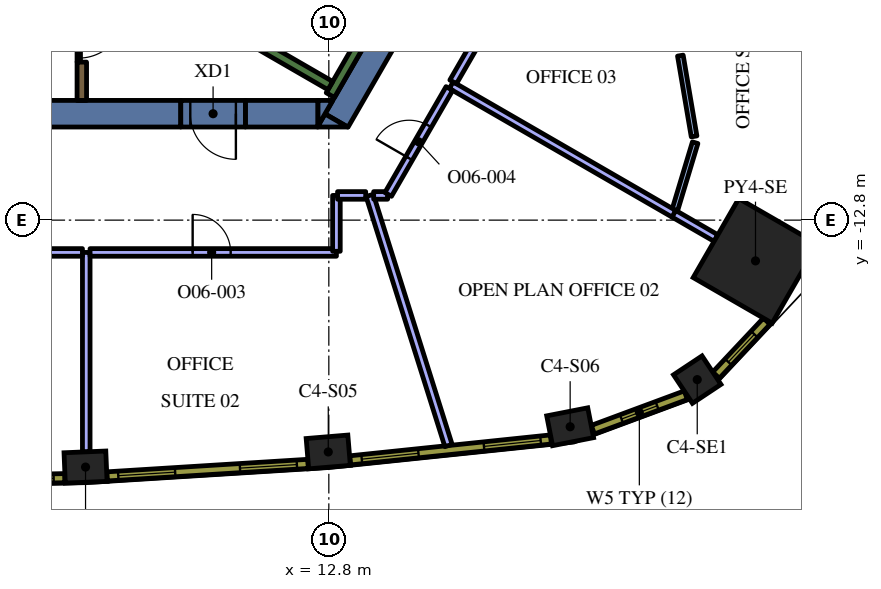
"""IFC4 building model, lengths in metres.
Left out: names, types, materials, properties, quantities, classifications, styles, units other than length and angle.
Written with IfcOpenShell. Run it as: python <this file> out.ifc"""

import sys

from ifc_helpers import new_model, si_unit, direction, frame, frame_2d, origin, origin_2d, place, context, subcontext, project, spatial, polyline, rectangle, outline, extrude, element, fill, save


model = new_model("IFC4")
c1 = context("Model", 3, precision=1e-05, world=origin(), true_north=direction((0.0, 1.0)))
c2 = subcontext(c1, "Body", "Model", "MODEL_VIEW")
j1 = project(units=[si_unit("LENGTHUNIT", "METRE"), si_unit("PLANEANGLEUNIT", "RADIAN")], contexts=[c1])
p1 = place(None, origin())
s1 = spatial("IfcSite", under=j1, at=p1, CompositionType="ELEMENT")
p2 = place(p1, origin())
s2 = spatial("IfcBuilding", under=s1, at=p2, CompositionType="ELEMENT")
p3 = place(p2, frame((0.0, 0.0, 201.6)))
s3 = spatial("IfcBuildingStorey", under=s2, at=p3, CompositionType="ELEMENT", Elevation=201.6)
p4 = place(p3, frame((24.027, -13.872, 0.0), z_axis=(0.0, 0.0, 1.0), x_axis=(0.866025403784, -0.5, 0.0)))
e1 = element("IfcColumn", 1, at=p4, inside=s3, PredefinedType="COLUMN", context=c2, shape_type="SweptSolid", body=[
    extrude(rectangle(XDim=2.4, YDim=2.4, at=origin_2d()), origin(), (0.0, 0.0, 1.0), 4.2),
])
for number, where, z_axis, x_axis in (
    (2, (6.398, -19.298, 0.0), (0.0, 0.0, 1.0), (0.999, 0.041, 0.0)),
    (3, (12.785, -18.9, 0.0), (0.0, 0.0, 1.0), (0.997, 0.083, 0.0)),
    (4, (19.15, -18.237, 0.0), (0.0, 0.0, 1.0), (0.981, 0.192, 0.0)),
):
    element("IfcColumn", number, at=place(p3, frame(where, z_axis=z_axis, x_axis=x_axis)), inside=s3, PredefinedType="COLUMN", context=c2, shape_type="SweptSolid", body=[
        extrude(rectangle(XDim=1.1, YDim=0.8, at=origin_2d()), origin(), (0.0, 0.0, 1.0), 4.2),
    ])
p5 = place(p3, frame((22.494, -16.997, 0.0), z_axis=(0.0, 0.0, 1.0), x_axis=(0.833238868178, 0.552913183563, 0.0)))
e5 = element("IfcColumn", 5, at=p5, inside=s3, PredefinedType="COLUMN", context=c2, shape_type="SweptSolid", body=[
    extrude(rectangle(XDim=0.9, YDim=0.9, at=origin_2d()), origin(), (0.0, 0.0, 1.0), 4.2),
])
p6 = place(p3, frame((13.003, -10.179, 0.0), z_axis=(0.0, 0.0, 1.0), x_axis=(0.499972675833, 0.866041178825, 0.0)))
e6 = element("IfcWall", 6, at=p6, inside=s3, PredefinedType="SOLIDWALL", context=c2, shape_type="SweptSolid", body=[
    extrude(rectangle(XDim=3.829, YDim=0.7, at=frame_2d((1.915, 0.0))), origin(), (0.0, 0.0, 1.0), 4.2),
])
p7 = place(p3, origin())
e7 = element("IfcWall", 7, at=p7, inside=s3, PredefinedType="SOLIDWALL", context=c2, shape_type="SweptSolid", body=[
    extrude(outline(polyline([(12.5, -10.35), (12.698, -10.005), (13.296, -10.35), (12.5, -10.35)])), origin(), (0.0, 0.0, 1.0), 4.2),
])
p8 = place(p3, frame((10.604, -10.0, 0.0), z_axis=(0.0, 0.0, 1.0), x_axis=(1.0, 0.0, 0.0)))
e8 = element("IfcWall", 8, at=p8, inside=s3, PredefinedType="SOLIDWALL", context=c2, shape_type="SweptSolid", body=[
    extrude(rectangle(XDim=1.909, YDim=0.7, at=frame_2d((0.955, 0.0))), origin(), (0.0, 0.0, 1.0), 4.2),
])
e9 = element("IfcWall", 9, at=p7, inside=s3, PredefinedType="SOLIDWALL", context=c2, shape_type="SweptSolid", body=[
    extrude(outline(polyline([(12.904, -9.65), (12.516, -10.322), (12.516, -9.65), (12.904, -9.65)])), origin(), (0.0, 0.0, 1.0), 4.2),
])
p9 = place(p3, frame((8.904, -10.0, 0.0), z_axis=(0.0, 0.0, 1.0), x_axis=(-1.0, 0.0, 0.0)))
e10 = element("IfcWall", 10, at=p9, inside=s3, PredefinedType="SOLIDWALL", context=c2, shape_type="SweptSolid", body=[
    extrude(rectangle(XDim=22.226, YDim=0.7, at=frame_2d((11.113, 0.0))), origin(), (0.0, 0.0, 1.0), 4.2),
])
p10 = place(p3, frame((12.84, -9.511, 0.0), z_axis=(0.0, 0.0, 1.0), x_axis=(0.500048121057, 0.865997619297, 0.0)))
e11 = element("IfcWall", 11, at=p10, inside=s3, PredefinedType="SOLIDWALL", context=c2, shape_type="SweptSolid", body=[
    extrude(rectangle(XDim=3.634, YDim=0.25, at=frame_2d((1.817, 0.0))), origin(), (0.0, 0.0, 1.0), 4.2),
])
p11 = place(p3, frame((12.84, -9.261, 0.0), z_axis=(0.0, 0.0, 1.0), x_axis=(-0.866013990052, 0.500019768644, 0.0)))
e12 = element("IfcWall", 12, at=p11, inside=s3, PredefinedType="SOLIDWALL", context=c2, shape_type="SweptSolid", body=[
    extrude(rectangle(XDim=6.8, YDim=0.25, at=frame_2d((3.4, 0.0))), origin(), (0.0, 0.0, 1.0), 4.2),
])
p12 = place(p3, frame((6.3, -9.65, 0.0), z_axis=(0.0, 0.0, 1.0), x_axis=(0.0, 1.0, 0.0)))
e13 = element("IfcWall", 13, at=p12, inside=s3, PredefinedType="SOLIDWALL", context=c2, shape_type="SweptSolid", body=[
    extrude(rectangle(XDim=1.008, YDim=0.25, at=frame_2d((0.504, 0.0))), origin(), (0.0, 0.0, 1.0), 4.2),
])
p13 = place(p3, frame((6.22, -7.237, 0.0), z_axis=(0.0, 0.0, 1.0), x_axis=(0.0, -1.0, 0.0)))
e14 = element("IfcWall", 14, at=p13, inside=s3, PredefinedType="PARTITIONING", context=c2, shape_type="SweptSolid", body=[
    extrude(rectangle(XDim=1.4, YDim=0.09, at=frame_2d((0.7, 0.0))), origin(), (0.0, 0.0, 1.0), 3.45),
])
p14 = place(p13, frame((0.1, 0.0, 0.0)))
e15 = element("IfcOpeningElement", 15, at=p14, cuts=e14, PredefinedType="OPENING", context=c2, shape_type="SweptSolid", body=[
    extrude(rectangle(XDim=1.2, YDim=2.1, at=frame_2d((0.6, 1.05))), frame((0.0, 0.055, 0.0), z_axis=(0.0, -1.0, 0.0), x_axis=(1.0, 0.0, 0.0)), (0.0, 0.0, 1.0), 0.11),
])
p15 = place(p3, frame((10.604, -10.0, 0.0), z_axis=(0.0, 0.0, 1.0), x_axis=(-1.0, 0.0, 0.0)))
e16 = element("IfcWall", 16, at=p15, inside=s3, PredefinedType="SOLIDWALL", context=c2, shape_type="SweptSolid", body=[
    extrude(rectangle(XDim=1.7, YDim=0.7, at=frame_2d((0.85, 0.0))), origin(), (0.0, 0.0, 1.0), 4.2),
])
p16 = place(p15, frame((0.25, 0.0, 0.0)))
e17 = element("IfcOpeningElement", 17, at=p16, cuts=e16, PredefinedType="OPENING", context=c2, shape_type="SweptSolid", body=[
    extrude(rectangle(XDim=1.2, YDim=2.1, at=frame_2d((0.6, 1.05))), frame((0.0, 0.36, 0.0), z_axis=(0.0, -1.0, 0.0), x_axis=(1.0, 0.0, 0.0)), (0.0, 0.0, 1.0), 0.72),
])
p17 = place(p3, frame((6.417, -13.65, 0.0), z_axis=(0.0, 0.0, 1.0), x_axis=(0.0, -1.0, 0.0)))
e18 = element("IfcWall", 18, at=p17, inside=s3, PredefinedType="PARTITIONING", context=c2, shape_type="SweptSolid", body=[
    extrude(rectangle(XDim=5.247, YDim=0.2, at=frame_2d((2.624, 0.0))), origin(), (0.0, 0.0, 1.0), 3.45),
])
p18 = place(p3, frame((-6.317, -13.65, 0.0), z_axis=(0.0, 0.0, 1.0), x_axis=(1.0, 0.0, 0.0)))
e19 = element("IfcWall", 19, at=p18, inside=s3, PredefinedType="PARTITIONING", context=c2, shape_type="SweptSolid", body=[
    extrude(rectangle(XDim=12.634, YDim=0.2, at=frame_2d((6.317, 0.0))), origin(), (0.0, 0.0, 1.0), 3.45),
])
p19 = place(p18, frame((5.8, 0.0, 0.0)))
e20 = element("IfcOpeningElement", 20, at=p19, cuts=e19, PredefinedType="OPENING", context=c2, shape_type="SweptSolid", body=[
    extrude(rectangle(XDim=1.0, YDim=2.1, at=frame_2d((0.5, 1.05))), frame((0.0, 0.11, 0.0), z_axis=(0.0, -1.0, 0.0), x_axis=(1.0, 0.0, 0.0)), (0.0, 0.0, 1.0), 0.22),
])
p20 = place(p3, frame((13.875, -12.15, 0.0), z_axis=(0.0, 0.0, 1.0), x_axis=(0.3005606746, -0.953762696316, 0.0)))
e21 = element("IfcWall", 21, at=p20, inside=s3, PredefinedType="PARTITIONING", context=c2, shape_type="SweptSolid", body=[
    extrude(rectangle(XDim=6.9, YDim=0.2, at=frame_2d((3.45, 0.0))), origin(), (0.0, 0.0, 1.0), 3.45),
])
p21 = place(p3, frame((6.517, -13.65, 0.0), z_axis=(0.0, 0.0, 1.0), x_axis=(1.0, 0.0, 0.0)))
e22 = element("IfcWall", 22, at=p21, inside=s3, PredefinedType="PARTITIONING", context=c2, shape_type="SweptSolid", body=[
    extrude(rectangle(XDim=6.483, YDim=0.2, at=frame_2d((3.242, 0.0))), origin(), (0.0, 0.0, 1.0), 3.45),
])
p22 = place(p21, frame((2.7, 0.0, 0.0)))
e23 = element("IfcOpeningElement", 23, at=p22, cuts=e22, PredefinedType="OPENING", context=c2, shape_type="SweptSolid", body=[
    extrude(rectangle(XDim=1.0, YDim=2.1, at=frame_2d((0.5, 1.05))), frame((0.0, 0.11, 0.0), z_axis=(0.0, -1.0, 0.0), x_axis=(1.0, 0.0, 0.0)), (0.0, 0.0, 1.0), 0.22),
])
p23 = place(p3, frame((13.0, -13.62, 0.0), z_axis=(0.0, 0.0, 1.0), x_axis=(0.0, 1.0, 0.0)))
e24 = element("IfcWall", 24, at=p23, inside=s3, PredefinedType="PARTITIONING", context=c2, shape_type="SweptSolid", body=[
    extrude(rectangle(XDim=1.47, YDim=0.2, at=frame_2d((0.735, 0.0))), origin(), (0.0, 0.0, 1.0), 3.45),
])
p24 = place(p3, frame((13.03, -12.15, 0.0), z_axis=(0.0, 0.0, 1.0), x_axis=(1.0, 0.0, 0.0)))
e25 = element("IfcWall", 25, at=p24, inside=s3, PredefinedType="PARTITIONING", context=c2, shape_type="SweptSolid", body=[
    extrude(rectangle(XDim=0.74, YDim=0.2, at=frame_2d((0.37, 0.0))), origin(), (0.0, 0.0, 1.0), 3.45),
])
p25 = place(p3, frame((21.873, -12.628, 0.0), z_axis=(0.0, 0.0, 1.0), x_axis=(0.866052988967, -0.499952218018, 0.0)))
e26 = element("IfcWall", 26, at=p25, inside=s3, PredefinedType="PARTITIONING", context=c2, shape_type="SweptSolid", body=[
    extrude(rectangle(XDim=1.288, YDim=0.2, at=frame_2d((0.644, 0.0))), origin(), (0.0, 0.0, 1.0), 3.45),
])
p26 = place(p3, frame((16.021, -9.25, 0.0), z_axis=(0.0, 0.0, 1.0), x_axis=(0.86602692059, -0.499997372806, 0.0)))
e27 = element("IfcWall", 27, at=p26, inside=s3, PredefinedType="PARTITIONING", context=c2, shape_type="SweptSolid", body=[
    extrude(rectangle(XDim=6.765, YDim=0.2, at=frame_2d((3.382, 0.0))), origin(), (0.0, 0.0, 1.0), 3.45),
])
p27 = place(p3, frame((13.98, -12.15, 0.0), z_axis=(0.0, 0.0, 1.0), x_axis=(1.0, 0.0, 0.0)))
e28 = element("IfcWall", 28, at=p27, inside=s3, PredefinedType="PARTITIONING", context=c2, shape_type="SweptSolid", body=[
    extrude(rectangle(XDim=0.367, YDim=0.2, at=frame_2d((0.184, 0.0))), origin(), (0.0, 0.0, 1.0), 3.45),
])
p28 = place(p3, frame((14.362, -12.124, 0.0), z_axis=(0.0, 0.0, 1.0), x_axis=(0.500022299258, 0.866012528919, 0.0)))
e29 = element("IfcWall", 29, at=p28, inside=s3, PredefinedType="PARTITIONING", context=c2, shape_type="SweptSolid", body=[
    extrude(rectangle(XDim=3.219, YDim=0.2, at=frame_2d((1.609, 0.0))), origin(), (0.0, 0.0, 1.0), 3.45),
])
p29 = place(p28, frame((1.1, 0.0, 0.0)))
e30 = element("IfcOpeningElement", 30, at=p29, cuts=e29, PredefinedType="OPENING", context=c2, shape_type="SweptSolid", body=[
    extrude(rectangle(XDim=1.0, YDim=2.1, at=frame_2d((0.5, 1.05))), frame((0.0, 0.11, 0.0), z_axis=(0.0, -1.0, 0.0), x_axis=(1.0, 0.0, 0.0)), (0.0, 0.0, 1.0), 0.22),
])
p30 = place(p3, frame((21.906, -12.532, 0.0), z_axis=(0.0, 0.0, 1.0), x_axis=(0.288789848591, 0.957392512688, 0.0)))
e31 = element("IfcWall", 31, at=p30, inside=s3, PredefinedType="PARTITIONING", context=c2, shape_type="SweptSolid", body=[
    extrude(rectangle(XDim=1.848, YDim=0.15, at=frame_2d((0.924, 0.0))), origin(), (0.0, 0.0, 1.0), 3.45),
])
p31 = place(p3, frame((22.412, -10.597, 0.0), z_axis=(0.0, 0.0, 1.0), x_axis=(-0.167612004459, 0.985853039738, 0.0)))
e32 = element("IfcWall", 32, at=p31, inside=s3, PredefinedType="PARTITIONING", context=c2, shape_type="SweptSolid", body=[
    extrude(rectangle(XDim=2.156, YDim=0.15, at=frame_2d((1.078, 0.0))), origin(), (0.0, 0.0, 1.0), 3.45),
])
p32 = place(p3, frame((16.072, -9.163, 0.0), z_axis=(0.0, 0.0, 1.0), x_axis=(0.500010870188, 0.866019127788, 0.0)))
e33 = element("IfcWall", 33, at=p32, inside=s3, PredefinedType="PARTITIONING", context=c2, shape_type="SweptSolid", body=[
    extrude(rectangle(XDim=3.249, YDim=0.2, at=frame_2d((1.624, 0.0))), origin(), (0.0, 0.0, 1.0), 3.45),
])
p33 = place(p3, frame((0.556, -19.699, 0.0), z_axis=(0.0, 0.0, 1.0), x_axis=(0.999784035184, 0.020781794712, 0.0)))
e34 = element("IfcWall", 34, at=p33, inside=s3, PredefinedType="SOLIDWALL", context=c2, shape_type="SweptSolid", body=[
    extrude(rectangle(XDim=5.298, YDim=0.24, at=frame_2d((2.649, 0.0))), origin(), (0.0, 0.0, 1.0), 3.95),
])
p34 = place(p33, frame((0.294, 0.0, 0.9)))
e35 = element("IfcOpeningElement", 35, at=p34, cuts=e34, PredefinedType="OPENING", context=c2, shape_type="SweptSolid", body=[
    extrude(rectangle(XDim=1.5, YDim=2.55, at=frame_2d((0.75, 1.275))), frame((0.0, 0.13, 0.0), z_axis=(0.0, -1.0, 0.0), x_axis=(1.0, 0.0, 0.0)), (0.0, 0.0, 1.0), 0.26),
])
p35 = place(p33, frame((3.504, 0.0, 0.9)))
e36 = element("IfcOpeningElement", 36, at=p35, cuts=e34, PredefinedType="OPENING", context=c2, shape_type="SweptSolid", body=[
    extrude(rectangle(XDim=1.5, YDim=2.55, at=frame_2d((0.75, 1.275))), frame((0.0, 0.13, 0.0), z_axis=(0.0, -1.0, 0.0), x_axis=(1.0, 0.0, 0.0)), (0.0, 0.0, 1.0), 0.26),
])
p36 = place(p3, frame((6.965, -19.543, 0.0), z_axis=(0.0, 0.0, 1.0), x_axis=(0.9980633213, 0.062206162685, 0.0)))
e37 = element("IfcWall", 37, at=p36, inside=s3, PredefinedType="SOLIDWALL", context=c2, shape_type="SweptSolid", body=[
    extrude(rectangle(XDim=5.298, YDim=0.24, at=frame_2d((2.649, 0.0))), origin(), (0.0, 0.0, 1.0), 3.95),
])
p37 = place(p36, frame((0.295, 0.0, 0.9)))
e38 = element("IfcOpeningElement", 38, at=p37, cuts=e37, PredefinedType="OPENING", context=c2, shape_type="SweptSolid", body=[
    extrude(rectangle(XDim=1.5, YDim=2.55, at=frame_2d((0.75, 1.275))), frame((0.0, 0.13, 0.0), z_axis=(0.0, -1.0, 0.0), x_axis=(1.0, 0.0, 0.0)), (0.0, 0.0, 1.0), 0.26),
])
p38 = place(p36, frame((3.504, 0.0, 0.9)))
e39 = element("IfcOpeningElement", 39, at=p38, cuts=e37, PredefinedType="OPENING", context=c2, shape_type="SweptSolid", body=[
    extrude(rectangle(XDim=1.5, YDim=2.55, at=frame_2d((0.75, 1.275))), frame((0.0, 0.13, 0.0), z_axis=(0.0, -1.0, 0.0), x_axis=(1.0, 0.0, 0.0)), (0.0, 0.0, 1.0), 0.26),
])
p39 = place(p3, frame((13.362, -19.121, 0.0), z_axis=(0.0, 0.0, 1.0), x_axis=(0.994621961215, 0.103571976272, 0.0)))
e40 = element("IfcWall", 40, at=p39, inside=s3, PredefinedType="SOLIDWALL", context=c2, shape_type="SweptSolid", body=[
    extrude(rectangle(XDim=5.311, YDim=0.24, at=frame_2d((2.655, 0.0))), origin(), (0.0, 0.0, 1.0), 3.95),
])
p40 = place(p39, frame((0.306, 0.0, 0.9)))
e41 = element("IfcOpeningElement", 41, at=p40, cuts=e40, PredefinedType="OPENING", context=c2, shape_type="SweptSolid", body=[
    extrude(rectangle(XDim=1.5, YDim=2.55, at=frame_2d((0.75, 1.275))), frame((0.0, 0.13, 0.0), z_axis=(0.0, -1.0, 0.0), x_axis=(1.0, 0.0, 0.0)), (0.0, 0.0, 1.0), 0.26),
])
p41 = place(p39, frame((3.539, 0.0, 0.9)))
e42 = element("IfcOpeningElement", 42, at=p41, cuts=e40, PredefinedType="OPENING", context=c2, shape_type="SweptSolid", body=[
    extrude(rectangle(XDim=1.5, YDim=2.55, at=frame_2d((0.75, 1.275))), frame((0.0, 0.13, 0.0), z_axis=(0.0, -1.0, 0.0), x_axis=(1.0, 0.0, 0.0)), (0.0, 0.0, 1.0), 0.26),
])
p42 = place(p3, frame((19.748, -18.314, 0.0), z_axis=(0.0, 0.0, 1.0), x_axis=(0.937569171184, 0.347798863203, 0.0)))
e43 = element("IfcWall", 43, at=p42, inside=s3, PredefinedType="SOLIDWALL", context=c2, shape_type="SweptSolid", body=[
    extrude(rectangle(XDim=2.609, YDim=0.24, at=frame_2d((1.305, 0.0))), origin(), (0.0, 0.0, 1.0), 3.95),
])
p43 = place(p42, frame((0.805, 0.0, 0.9)))
e44 = element("IfcOpeningElement", 44, at=p43, cuts=e43, PredefinedType="OPENING", context=c2, shape_type="SweptSolid", body=[
    extrude(rectangle(XDim=1.0, YDim=2.55, at=frame_2d((0.5, 1.275))), frame((0.0, 0.13, 0.0), z_axis=(0.0, -1.0, 0.0), x_axis=(1.0, 0.0, 0.0)), (0.0, 0.0, 1.0), 0.26),
])
p44 = place(p3, frame((22.989, -16.879, 0.0), z_axis=(0.0, 0.0, 1.0), x_axis=(0.684770274166, 0.728758994194, 0.0)))
e45 = element("IfcWall", 45, at=p44, inside=s3, PredefinedType="SOLIDWALL", context=c2, shape_type="SweptSolid", body=[
    extrude(rectangle(XDim=1.948, YDim=0.24, at=frame_2d((0.974, 0.0))), origin(), (0.0, 0.0, 1.0), 3.95),
])
p45 = place(p44, frame((0.474, 0.0, 0.9)))
e46 = element("IfcOpeningElement", 46, at=p45, cuts=e45, PredefinedType="OPENING", context=c2, shape_type="SweptSolid", body=[
    extrude(rectangle(XDim=1.0, YDim=2.55, at=frame_2d((0.5, 1.275))), frame((0.0, 0.13, 0.0), z_axis=(0.0, -1.0, 0.0), x_axis=(1.0, 0.0, 0.0)), (0.0, 0.0, 1.0), 0.26),
])
p46 = place(p14, origin())
e47 = element("IfcDoor", 47, at=p46, inside=s3, OperationType="SINGLE_SWING_LEFT", PredefinedType="DOOR", context=c2, shape_type="SweptSolid", body=[
    extrude(rectangle(XDim=1.2, YDim=2.1, at=frame_2d((0.6, 1.05))), frame((0.0, 0.025, 0.0), z_axis=(0.0, -1.0, 0.0), x_axis=(1.0, 0.0, 0.0)), (0.0, 0.0, 1.0), 0.05),
])
fill(e15, e47)
p47 = place(p16, origin())
e48 = element("IfcDoor", 48, at=p47, inside=s3, OperationType="SINGLE_SWING_LEFT", PredefinedType="DOOR", context=c2, shape_type="SweptSolid", body=[
    extrude(rectangle(XDim=1.2, YDim=2.1, at=frame_2d((0.6, 1.05))), frame((0.0, 0.025, 0.0), z_axis=(0.0, -1.0, 0.0), x_axis=(1.0, 0.0, 0.0)), (0.0, 0.0, 1.0), 0.05),
])
fill(e17, e48)
p48 = place(p22, origin())
e49 = element("IfcDoor", 49, at=p48, inside=s3, OperationType="SINGLE_SWING_LEFT", PredefinedType="DOOR", context=c2, shape_type="SweptSolid", body=[
    extrude(rectangle(XDim=1.0, YDim=2.1, at=frame_2d((0.5, 1.05))), frame((0.0, 0.025, 0.0), z_axis=(0.0, -1.0, 0.0), x_axis=(1.0, 0.0, 0.0)), (0.0, 0.0, 1.0), 0.05),
])
fill(e23, e49)
p49 = place(p29, origin())
e50 = element("IfcDoor", 50, at=p49, inside=s3, OperationType="SINGLE_SWING_LEFT", PredefinedType="DOOR", context=c2, shape_type="SweptSolid", body=[
    extrude(rectangle(XDim=1.0, YDim=2.1, at=frame_2d((0.5, 1.05))), frame((0.0, 0.025, 0.0), z_axis=(0.0, -1.0, 0.0), x_axis=(1.0, 0.0, 0.0)), (0.0, 0.0, 1.0), 0.05),
])
fill(e30, e50)
p50 = place(p35, origin())
e51 = element("IfcWindow", 51, at=p50, inside=s3, PartitioningType="SINGLE_PANEL", PredefinedType="WINDOW", context=c2, shape_type="SweptSolid", body=[
    extrude(rectangle(XDim=1.5, YDim=2.55, at=frame_2d((0.75, 1.275))), frame((0.0, 0.04, 0.0), z_axis=(0.0, -1.0, 0.0), x_axis=(1.0, 0.0, 0.0)), (0.0, 0.0, 1.0), 0.06),
])
fill(e36, e51)
p51 = place(p37, origin())
e52 = element("IfcWindow", 52, at=p51, inside=s3, PartitioningType="SINGLE_PANEL", PredefinedType="WINDOW", context=c2, shape_type="SweptSolid", body=[
    extrude(rectangle(XDim=1.5, YDim=2.55, at=frame_2d((0.75, 1.275))), frame((0.0, 0.04, 0.0), z_axis=(0.0, -1.0, 0.0), x_axis=(1.0, 0.0, 0.0)), (0.0, 0.0, 1.0), 0.06),
])
fill(e38, e52)
p52 = place(p38, origin())
e53 = element("IfcWindow", 53, at=p52, inside=s3, PartitioningType="SINGLE_PANEL", PredefinedType="WINDOW", context=c2, shape_type="SweptSolid", body=[
    extrude(rectangle(XDim=1.5, YDim=2.55, at=frame_2d((0.75, 1.275))), frame((0.0, 0.04, 0.0), z_axis=(0.0, -1.0, 0.0), x_axis=(1.0, 0.0, 0.0)), (0.0, 0.0, 1.0), 0.06),
])
fill(e39, e53)
p53 = place(p40, origin())
e54 = element("IfcWindow", 54, at=p53, inside=s3, PartitioningType="SINGLE_PANEL", PredefinedType="WINDOW", context=c2, shape_type="SweptSolid", body=[
    extrude(rectangle(XDim=1.5, YDim=2.55, at=frame_2d((0.75, 1.275))), frame((0.0, 0.04, 0.0), z_axis=(0.0, -1.0, 0.0), x_axis=(1.0, 0.0, 0.0)), (0.0, 0.0, 1.0), 0.06),
])
fill(e41, e54)
p54 = place(p41, origin())
e55 = element("IfcWindow", 55, at=p54, inside=s3, PartitioningType="SINGLE_PANEL", PredefinedType="WINDOW", context=c2, shape_type="SweptSolid", body=[
    extrude(rectangle(XDim=1.5, YDim=2.55, at=frame_2d((0.75, 1.275))), frame((0.0, 0.04, 0.0), z_axis=(0.0, -1.0, 0.0), x_axis=(1.0, 0.0, 0.0)), (0.0, 0.0, 1.0), 0.06),
])
fill(e42, e55)
p55 = place(p43, origin())
e56 = element("IfcWindow", 56, at=p55, inside=s3, PartitioningType="SINGLE_PANEL", PredefinedType="WINDOW", context=c2, shape_type="SweptSolid", body=[
    extrude(rectangle(XDim=1.0, YDim=2.55, at=frame_2d((0.5, 1.275))), frame((0.0, 0.04, 0.0), z_axis=(0.0, -1.0, 0.0), x_axis=(1.0, 0.0, 0.0)), (0.0, 0.0, 1.0), 0.06),
])
fill(e44, e56)
p56 = place(p45, origin())
e57 = element("IfcWindow", 57, at=p56, inside=s3, PartitioningType="SINGLE_PANEL", PredefinedType="WINDOW", context=c2, shape_type="SweptSolid", body=[
    extrude(rectangle(XDim=1.0, YDim=2.55, at=frame_2d((0.5, 1.275))), frame((0.0, 0.04, 0.0), z_axis=(0.0, -1.0, 0.0), x_axis=(1.0, 0.0, 0.0)), (0.0, 0.0, 1.0), 0.06),
])
fill(e46, e57)
save(model, sys.argv[1])
